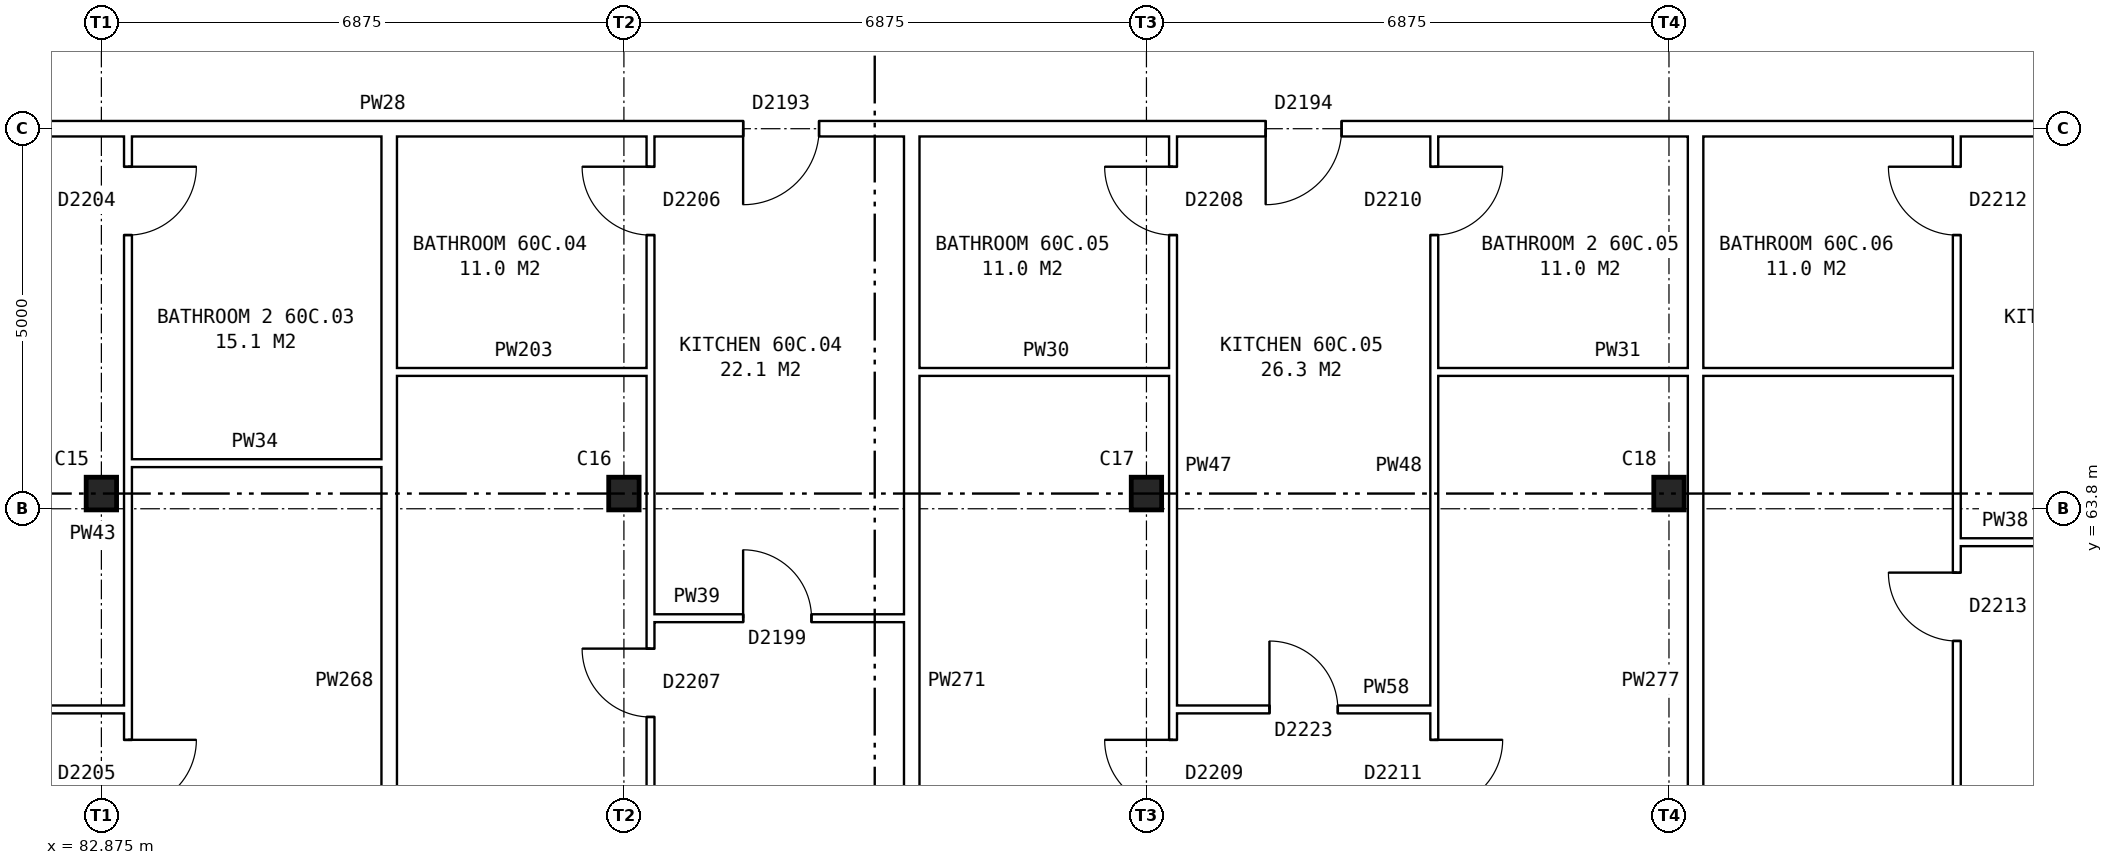
"""IFC4 building model, lengths in metres.
Left out: names, types, materials, properties, quantities, classifications, styles, units other than length and angle.
Written with IfcOpenShell. Run it as: python <this file> out.ifc"""

import sys

from ifc_helpers import new_model, si_unit, direction, frame, frame_2d, origin, origin_2d, place, context, subcontext, project, spatial, rectangle, i_section, extrude, element, fill, save


model = new_model("IFC4")
c1 = context("Model", 3, precision=1e-05, world=origin(), true_north=direction((0.0, 1.0)))
c2 = subcontext(c1, "Body", "Model", "MODEL_VIEW")
j1 = project(units=[si_unit("LENGTHUNIT", "METRE"), si_unit("PLANEANGLEUNIT", "RADIAN")], contexts=[c1])
p1 = place(None, origin())
s1 = spatial("IfcSite", under=j1, at=p1, CompositionType="ELEMENT")
p2 = place(p1, origin())
s2 = spatial("IfcBuilding", under=s1, at=p2, CompositionType="ELEMENT")
p3 = place(p2, frame((0.0, 0.0, 212.1)))
s3 = spatial("IfcBuildingStorey", under=s2, at=p3, CompositionType="ELEMENT", Elevation=212.1)
for number, where, z_axis, x_axis in (
    (1, (82.875, 64.0, 0.0), (0.0, 0.0, 1.0), (1.0, 0.0, 0.0)),
    (2, (89.75, 64.0, 0.0), (0.0, 0.0, 1.0), (1.0, 0.0, 0.0)),
    (3, (96.625, 64.0, 0.0), (0.0, 0.0, 1.0), (1.0, 0.0, 0.0)),
    (4, (103.5, 64.0, 0.0), (0.0, 0.0, 1.0), (1.0, 0.0, 0.0)),
):
    element("IfcColumn", number, at=place(p3, frame(where, z_axis=z_axis, x_axis=x_axis)), inside=s3, PredefinedType="COLUMN", context=c2, shape_type="SweptSolid", body=[
        extrude(i_section(OverallWidth=0.4, OverallDepth=0.43, WebThickness=0.04, FlangeThickness=0.04, at=origin_2d()), origin(), (0.0, 0.0, 1.0), 2.85),
    ])
p4 = place(p3, frame((79.438, 61.16, 0.0), z_axis=(0.0, 0.0, 1.0), x_axis=(1.0, 0.0, 0.0)))
e5 = element("IfcWall", 5, at=p4, inside=s3, PredefinedType="PARTITIONING", context=c2, shape_type="SweptSolid", body=[
    extrude(rectangle(XDim=3.787, YDim=0.1, at=frame_2d((1.894, 0.0))), origin(), (0.0, 0.0, 1.0), 2.85),
])
p5 = place(p4, frame((1.444, 0.0, 0.0)))
e6 = element("IfcOpeningElement", 6, at=p5, cuts=e5, PredefinedType="OPENING", context=c2, shape_type="SweptSolid", body=[
    extrude(rectangle(XDim=0.9, YDim=2.1, at=frame_2d((0.45, 1.05))), frame((0.0, 0.06, 0.0), z_axis=(0.0, -1.0, 0.0), x_axis=(1.0, 0.0, 0.0)), (0.0, 0.0, 1.0), 0.12),
])
p6 = place(p3, frame((96.975, 61.16, 0.0), z_axis=(0.0, 0.0, 1.0), x_axis=(1.0, 0.0, 0.0)))
e7 = element("IfcWall", 7, at=p6, inside=s3, PredefinedType="PARTITIONING", context=c2, shape_type="SweptSolid", body=[
    extrude(rectangle(XDim=3.437, YDim=0.1, at=frame_2d((1.719, 0.0))), origin(), (0.0, 0.0, 1.0), 2.85),
])
p7 = place(p6, frame((1.269, 0.0, 0.0)))
e8 = element("IfcOpeningElement", 8, at=p7, cuts=e7, PredefinedType="OPENING", context=c2, shape_type="SweptSolid", body=[
    extrude(rectangle(XDim=0.9, YDim=2.1, at=frame_2d((0.45, 1.05))), frame((0.0, 0.06, 0.0), z_axis=(0.0, -1.0, 0.0), x_axis=(1.0, 0.0, 0.0)), (0.0, 0.0, 1.0), 0.12),
])
p8 = place(p3, frame((90.1, 62.36, 0.0), z_axis=(0.0, 0.0, 1.0), x_axis=(1.0, 0.0, 0.0)))
e9 = element("IfcWall", 9, at=p8, inside=s3, PredefinedType="PARTITIONING", context=c2, shape_type="SweptSolid", body=[
    extrude(rectangle(XDim=3.337, YDim=0.1, at=frame_2d((1.668, 0.0))), origin(), (0.0, 0.0, 1.0), 2.85),
])
p9 = place(p8, frame((1.219, 0.0, 0.0)))
e10 = element("IfcOpeningElement", 10, at=p9, cuts=e9, PredefinedType="OPENING", context=c2, shape_type="SweptSolid", body=[
    extrude(rectangle(XDim=0.9, YDim=2.1, at=frame_2d((0.45, 1.05))), frame((0.0, 0.06, 0.0), z_axis=(0.0, -1.0, 0.0), x_axis=(1.0, 0.0, 0.0)), (0.0, 0.0, 1.0), 0.12),
])
p10 = place(p3, frame((107.287, 63.36, 0.0), z_axis=(0.0, 0.0, 1.0), x_axis=(1.0, 0.0, 0.0)))
e11 = element("IfcWall", 11, at=p10, inside=s3, PredefinedType="PARTITIONING", context=c2, shape_type="SweptSolid", body=[
    extrude(rectangle(XDim=3.438, YDim=0.1, at=frame_2d((1.719, 0.0))), origin(), (0.0, 0.0, 1.0), 2.85),
])
p11 = place(p10, frame((1.269, 0.0, 0.0)))
e12 = element("IfcOpeningElement", 12, at=p11, cuts=e11, PredefinedType="OPENING", context=c2, shape_type="SweptSolid", body=[
    extrude(rectangle(XDim=0.9, YDim=2.1, at=frame_2d((0.45, 1.05))), frame((0.0, 0.06, 0.0), z_axis=(0.0, -1.0, 0.0), x_axis=(1.0, 0.0, 0.0)), (0.0, 0.0, 1.0), 0.12),
])
p12 = place(p3, frame((83.225, 64.4, 0.0), z_axis=(0.0, 0.0, 1.0), x_axis=(1.0, 0.0, 0.0)))
e13 = element("IfcWall", 13, at=p12, inside=s3, PredefinedType="PARTITIONING", context=c2, shape_type="SweptSolid", body=[
    extrude(rectangle(XDim=3.337, YDim=0.1, at=frame_2d((1.668, 0.0))), origin(), (0.0, 0.0, 1.0), 2.85),
])
for number, where, z_axis, x_axis in (
    (14, (86.762, 65.6, 0.0), (0.0, 0.0, 1.0), (1.0, 0.0, 0.0)),
    (15, (93.637, 65.6, 0.0), (0.0, 0.0, 1.0), (1.0, 0.0, 0.0)),
):
    element("IfcWall", number, at=place(p3, frame(where, z_axis=z_axis, x_axis=x_axis)), inside=s3, PredefinedType="PARTITIONING", context=c2, shape_type="SweptSolid", body=[
        extrude(rectangle(XDim=3.338, YDim=0.1, at=frame_2d((1.669, 0.0))), origin(), (0.0, 0.0, 1.0), 2.85),
    ])
p13 = place(p3, frame((100.412, 65.6, 0.0), z_axis=(0.0, 0.0, 1.0), x_axis=(1.0, 0.0, 0.0)))
e16 = element("IfcWall", 16, at=p13, inside=s3, PredefinedType="PARTITIONING", context=c2, shape_type="SweptSolid", body=[
    extrude(rectangle(XDim=6.875, YDim=0.1, at=frame_2d((3.438, 0.0))), origin(), (0.0, 0.0, 1.0), 2.85),
])
p14 = place(p3, frame((75.64, 68.8, 0.0), z_axis=(0.0, 0.0, 1.0), x_axis=(1.0, 0.0, 0.0)))
e17 = element("IfcWall", 17, at=p14, inside=s3, PredefinedType="PARTITIONING", context=c2, shape_type="SweptSolid", body=[
    extrude(rectangle(XDim=55.72, YDim=0.2, at=frame_2d((27.86, 0.0))), origin(), (0.0, 0.0, 1.0), 2.85),
])
p15 = place(p14, frame((5.191, 0.0, 0.0)))
e18 = element("IfcOpeningElement", 18, at=p15, cuts=e17, PredefinedType="OPENING", context=c2, shape_type="SweptSolid", body=[
    extrude(rectangle(XDim=1.0, YDim=2.1, at=frame_2d((0.5, 1.05))), frame((0.0, 0.11, 0.0), z_axis=(0.0, -1.0, 0.0), x_axis=(1.0, 0.0, 0.0)), (0.0, 0.0, 1.0), 0.22),
])
p16 = place(p14, frame((15.678, 0.0, 0.0)))
e19 = element("IfcOpeningElement", 19, at=p16, cuts=e17, PredefinedType="OPENING", context=c2, shape_type="SweptSolid", body=[
    extrude(rectangle(XDim=1.0, YDim=2.1, at=frame_2d((0.5, 1.05))), frame((0.0, 0.11, 0.0), z_axis=(0.0, -1.0, 0.0), x_axis=(1.0, 0.0, 0.0)), (0.0, 0.0, 1.0), 0.22),
])
p17 = place(p14, frame((22.553, 0.0, 0.0)))
e20 = element("IfcOpeningElement", 20, at=p17, cuts=e17, PredefinedType="OPENING", context=c2, shape_type="SweptSolid", body=[
    extrude(rectangle(XDim=1.0, YDim=2.1, at=frame_2d((0.5, 1.05))), frame((0.0, 0.11, 0.0), z_axis=(0.0, -1.0, 0.0), x_axis=(1.0, 0.0, 0.0)), (0.0, 0.0, 1.0), 0.22),
])
p18 = place(p14, frame((32.866, 0.0, 0.0)))
e21 = element("IfcOpeningElement", 21, at=p18, cuts=e17, PredefinedType="OPENING", context=c2, shape_type="SweptSolid", body=[
    extrude(rectangle(XDim=1.0, YDim=2.1, at=frame_2d((0.5, 1.05))), frame((0.0, 0.11, 0.0), z_axis=(0.0, -1.0, 0.0), x_axis=(1.0, 0.0, 0.0)), (0.0, 0.0, 1.0), 0.22),
])
p19 = place(p14, frame((43.178, 0.0, 0.0)))
e22 = element("IfcOpeningElement", 22, at=p19, cuts=e17, PredefinedType="OPENING", context=c2, shape_type="SweptSolid", body=[
    extrude(rectangle(XDim=1.0, YDim=2.1, at=frame_2d((0.5, 1.05))), frame((0.0, 0.11, 0.0), z_axis=(0.0, -1.0, 0.0), x_axis=(1.0, 0.0, 0.0)), (0.0, 0.0, 1.0), 0.22),
])
p20 = place(p14, frame((50.053, 0.0, 0.0)))
e23 = element("IfcOpeningElement", 23, at=p20, cuts=e17, PredefinedType="OPENING", context=c2, shape_type="SweptSolid", body=[
    extrude(rectangle(XDim=1.0, YDim=2.1, at=frame_2d((0.5, 1.05))), frame((0.0, 0.11, 0.0), z_axis=(0.0, -1.0, 0.0), x_axis=(1.0, 0.0, 0.0)), (0.0, 0.0, 1.0), 0.22),
])
p21 = place(p3, frame((83.225, 54.36, 0.0), z_axis=(0.0, 0.0, 1.0), x_axis=(0.0, 1.0, 0.0)))
e24 = element("IfcWall", 24, at=p21, inside=s3, PredefinedType="PARTITIONING", context=c2, shape_type="SweptSolid", body=[
    extrude(rectangle(XDim=14.34, YDim=0.1, at=frame_2d((7.17, 0.0))), origin(), (0.0, 0.0, 1.0), 2.85),
])
p22 = place(p21, frame((5.5, 0.0, 0.0)))
e25 = element("IfcOpeningElement", 25, at=p22, cuts=e24, PredefinedType="OPENING", context=c2, shape_type="SweptSolid", body=[
    extrude(rectangle(XDim=0.9, YDim=2.1, at=frame_2d((0.45, 1.05))), frame((0.0, 0.06, 0.0), z_axis=(0.0, -1.0, 0.0), x_axis=(1.0, 0.0, 0.0)), (0.0, 0.0, 1.0), 0.12),
])
p23 = place(p21, frame((13.04, 0.0, 0.0)))
e26 = element("IfcOpeningElement", 26, at=p23, cuts=e24, PredefinedType="OPENING", context=c2, shape_type="SweptSolid", body=[
    extrude(rectangle(XDim=0.9, YDim=2.1, at=frame_2d((0.45, 1.05))), frame((0.0, 0.06, 0.0), z_axis=(0.0, -1.0, 0.0), x_axis=(1.0, 0.0, 0.0)), (0.0, 0.0, 1.0), 0.12),
])
p24 = place(p3, frame((86.662, 54.36, 0.0), z_axis=(0.0, 0.0, 1.0), x_axis=(0.0, 1.0, 0.0)))
e27 = element("IfcWall", 27, at=p24, inside=s3, PredefinedType="PARTITIONING", context=c2, shape_type="SweptSolid", body=[
    extrude(rectangle(XDim=14.34, YDim=0.2, at=frame_2d((7.17, 0.0))), origin(), (0.0, 0.0, 1.0), 2.85),
])
p25 = place(p3, frame((90.1, 54.36, 0.0), z_axis=(0.0, 0.0, 1.0), x_axis=(0.0, 1.0, 0.0)))
e28 = element("IfcWall", 28, at=p25, inside=s3, PredefinedType="PARTITIONING", context=c2, shape_type="SweptSolid", body=[
    extrude(rectangle(XDim=14.34, YDim=0.1, at=frame_2d((7.17, 0.0))), origin(), (0.0, 0.0, 1.0), 2.85),
])
p26 = place(p25, frame((6.7, 0.0, 0.0)))
e29 = element("IfcOpeningElement", 29, at=p26, cuts=e28, PredefinedType="OPENING", context=c2, shape_type="SweptSolid", body=[
    extrude(rectangle(XDim=0.9, YDim=2.1, at=frame_2d((0.45, 1.05))), frame((0.0, 0.06, 0.0), z_axis=(0.0, -1.0, 0.0), x_axis=(1.0, 0.0, 0.0)), (0.0, 0.0, 1.0), 0.12),
])
p27 = place(p25, frame((13.04, 0.0, 0.0)))
e30 = element("IfcOpeningElement", 30, at=p27, cuts=e28, PredefinedType="OPENING", context=c2, shape_type="SweptSolid", body=[
    extrude(rectangle(XDim=0.9, YDim=2.1, at=frame_2d((0.45, 1.05))), frame((0.0, 0.06, 0.0), z_axis=(0.0, -1.0, 0.0), x_axis=(1.0, 0.0, 0.0)), (0.0, 0.0, 1.0), 0.12),
])
p28 = place(p3, frame((93.537, 54.36, 0.0), z_axis=(0.0, 0.0, 1.0), x_axis=(0.0, 1.0, 0.0)))
e31 = element("IfcWall", 31, at=p28, inside=s3, PredefinedType="PARTITIONING", context=c2, shape_type="SweptSolid", body=[
    extrude(rectangle(XDim=14.34, YDim=0.2, at=frame_2d((7.17, 0.0))), origin(), (0.0, 0.0, 1.0), 2.85),
])
p29 = place(p3, frame((96.975, 54.36, 0.0), z_axis=(0.0, 0.0, 1.0), x_axis=(0.0, 1.0, 0.0)))
e32 = element("IfcWall", 32, at=p29, inside=s3, PredefinedType="PARTITIONING", context=c2, shape_type="SweptSolid", body=[
    extrude(rectangle(XDim=14.34, YDim=0.1, at=frame_2d((7.17, 0.0))), origin(), (0.0, 0.0, 1.0), 2.85),
])
p30 = place(p29, frame((5.5, 0.0, 0.0)))
e33 = element("IfcOpeningElement", 33, at=p30, cuts=e32, PredefinedType="OPENING", context=c2, shape_type="SweptSolid", body=[
    extrude(rectangle(XDim=0.9, YDim=2.1, at=frame_2d((0.45, 1.05))), frame((0.0, 0.06, 0.0), z_axis=(0.0, -1.0, 0.0), x_axis=(1.0, 0.0, 0.0)), (0.0, 0.0, 1.0), 0.12),
])
p31 = place(p29, frame((13.04, 0.0, 0.0)))
e34 = element("IfcOpeningElement", 34, at=p31, cuts=e32, PredefinedType="OPENING", context=c2, shape_type="SweptSolid", body=[
    extrude(rectangle(XDim=0.9, YDim=2.1, at=frame_2d((0.45, 1.05))), frame((0.0, 0.06, 0.0), z_axis=(0.0, -1.0, 0.0), x_axis=(1.0, 0.0, 0.0)), (0.0, 0.0, 1.0), 0.12),
])
p32 = place(p3, frame((100.412, 54.36, 0.0), z_axis=(0.0, 0.0, 1.0), x_axis=(0.0, 1.0, 0.0)))
e35 = element("IfcWall", 35, at=p32, inside=s3, PredefinedType="PARTITIONING", context=c2, shape_type="SweptSolid", body=[
    extrude(rectangle(XDim=14.34, YDim=0.1, at=frame_2d((7.17, 0.0))), origin(), (0.0, 0.0, 1.0), 2.85),
])
p33 = place(p32, frame((5.5, 0.0, 0.0)))
e36 = element("IfcOpeningElement", 36, at=p33, cuts=e35, PredefinedType="OPENING", context=c2, shape_type="SweptSolid", body=[
    extrude(rectangle(XDim=0.9, YDim=2.1, at=frame_2d((0.45, 1.05))), frame((0.0, 0.06, 0.0), z_axis=(0.0, -1.0, 0.0), x_axis=(1.0, 0.0, 0.0)), (0.0, 0.0, 1.0), 0.12),
])
p34 = place(p32, frame((13.04, 0.0, 0.0)))
e37 = element("IfcOpeningElement", 37, at=p34, cuts=e35, PredefinedType="OPENING", context=c2, shape_type="SweptSolid", body=[
    extrude(rectangle(XDim=0.9, YDim=2.1, at=frame_2d((0.45, 1.05))), frame((0.0, 0.06, 0.0), z_axis=(0.0, -1.0, 0.0), x_axis=(1.0, 0.0, 0.0)), (0.0, 0.0, 1.0), 0.12),
])
p35 = place(p3, frame((103.85, 54.36, 0.0), z_axis=(0.0, 0.0, 1.0), x_axis=(0.0, 1.0, 0.0)))
e38 = element("IfcWall", 38, at=p35, inside=s3, PredefinedType="PARTITIONING", context=c2, shape_type="SweptSolid", body=[
    extrude(rectangle(XDim=14.34, YDim=0.2, at=frame_2d((7.17, 0.0))), origin(), (0.0, 0.0, 1.0), 2.85),
])
p36 = place(p3, frame((107.287, 54.36, 0.0), z_axis=(0.0, 0.0, 1.0), x_axis=(0.0, 1.0, 0.0)))
e39 = element("IfcWall", 39, at=p36, inside=s3, PredefinedType="PARTITIONING", context=c2, shape_type="SweptSolid", body=[
    extrude(rectangle(XDim=14.34, YDim=0.1, at=frame_2d((7.17, 0.0))), origin(), (0.0, 0.0, 1.0), 2.85),
])
p37 = place(p36, frame((7.7, 0.0, 0.0)))
e40 = element("IfcOpeningElement", 40, at=p37, cuts=e39, PredefinedType="OPENING", context=c2, shape_type="SweptSolid", body=[
    extrude(rectangle(XDim=0.9, YDim=2.1, at=frame_2d((0.45, 1.05))), frame((0.0, 0.06, 0.0), z_axis=(0.0, -1.0, 0.0), x_axis=(1.0, 0.0, 0.0)), (0.0, 0.0, 1.0), 0.12),
])
p38 = place(p36, frame((13.04, 0.0, 0.0)))
e41 = element("IfcOpeningElement", 41, at=p38, cuts=e39, PredefinedType="OPENING", context=c2, shape_type="SweptSolid", body=[
    extrude(rectangle(XDim=0.9, YDim=2.1, at=frame_2d((0.45, 1.05))), frame((0.0, 0.06, 0.0), z_axis=(0.0, -1.0, 0.0), x_axis=(1.0, 0.0, 0.0)), (0.0, 0.0, 1.0), 0.12),
])
p39 = place(p22, frame((0.9, 0.0, 0.0), z_axis=(0.0, 0.0, 1.0), x_axis=(-1.0, 0.0, 0.0)))
e42 = element("IfcDoor", 42, at=p39, inside=s3, OperationType="SINGLE_SWING_LEFT", PredefinedType="DOOR", context=c2, shape_type="SweptSolid", body=[
    extrude(rectangle(XDim=0.9, YDim=2.1, at=frame_2d((0.45, 1.05))), frame((0.0, 0.025, 0.0), z_axis=(0.0, -1.0, 0.0), x_axis=(1.0, 0.0, 0.0)), (0.0, 0.0, 1.0), 0.05),
])
fill(e25, e42)
p40 = place(p23, frame((0.9, 0.0, 0.0), z_axis=(0.0, 0.0, 1.0), x_axis=(-1.0, 0.0, 0.0)))
e43 = element("IfcDoor", 43, at=p40, inside=s3, OperationType="SINGLE_SWING_LEFT", PredefinedType="DOOR", context=c2, shape_type="SweptSolid", body=[
    extrude(rectangle(XDim=0.9, YDim=2.1, at=frame_2d((0.45, 1.05))), frame((0.0, 0.025, 0.0), z_axis=(0.0, -1.0, 0.0), x_axis=(1.0, 0.0, 0.0)), (0.0, 0.0, 1.0), 0.05),
])
fill(e26, e43)
p41 = place(p26, origin())
e44 = element("IfcDoor", 44, at=p41, inside=s3, OperationType="SINGLE_SWING_RIGHT", PredefinedType="DOOR", context=c2, shape_type="SweptSolid", body=[
    extrude(rectangle(XDim=0.9, YDim=2.1, at=frame_2d((0.45, 1.05))), frame((0.0, 0.025, 0.0), z_axis=(0.0, -1.0, 0.0), x_axis=(1.0, 0.0, 0.0)), (0.0, 0.0, 1.0), 0.05),
])
fill(e29, e44)
p42 = place(p16, frame((1.0, 0.0, 0.0), z_axis=(0.0, 0.0, 1.0), x_axis=(-1.0, 0.0, 0.0)))
e45 = element("IfcDoor", 45, at=p42, inside=s3, OperationType="SINGLE_SWING_RIGHT", PredefinedType="DOOR", context=c2, shape_type="SweptSolid", body=[
    extrude(rectangle(XDim=1.0, YDim=2.1, at=frame_2d((0.5, 1.05))), frame((0.0, 0.025, 0.0), z_axis=(0.0, -1.0, 0.0), x_axis=(1.0, 0.0, 0.0)), (0.0, 0.0, 1.0), 0.05),
])
fill(e19, e45)
p43 = place(p9, origin())
e46 = element("IfcDoor", 46, at=p43, inside=s3, OperationType="SINGLE_SWING_LEFT", PredefinedType="DOOR", context=c2, shape_type="SweptSolid", body=[
    extrude(rectangle(XDim=0.9, YDim=2.1, at=frame_2d((0.45, 1.05))), frame((0.0, 0.025, 0.0), z_axis=(0.0, -1.0, 0.0), x_axis=(1.0, 0.0, 0.0)), (0.0, 0.0, 1.0), 0.05),
])
fill(e10, e46)
p44 = place(p27, origin())
e47 = element("IfcDoor", 47, at=p44, inside=s3, OperationType="SINGLE_SWING_RIGHT", PredefinedType="DOOR", context=c2, shape_type="SweptSolid", body=[
    extrude(rectangle(XDim=0.9, YDim=2.1, at=frame_2d((0.45, 1.05))), frame((0.0, 0.025, 0.0), z_axis=(0.0, -1.0, 0.0), x_axis=(1.0, 0.0, 0.0)), (0.0, 0.0, 1.0), 0.05),
])
fill(e30, e47)
p45 = place(p30, origin())
e48 = element("IfcDoor", 48, at=p45, inside=s3, OperationType="SINGLE_SWING_RIGHT", PredefinedType="DOOR", context=c2, shape_type="SweptSolid", body=[
    extrude(rectangle(XDim=0.9, YDim=2.1, at=frame_2d((0.45, 1.05))), frame((0.0, 0.025, 0.0), z_axis=(0.0, -1.0, 0.0), x_axis=(1.0, 0.0, 0.0)), (0.0, 0.0, 1.0), 0.05),
])
fill(e33, e48)
p46 = place(p33, frame((0.9, 0.0, 0.0), z_axis=(0.0, 0.0, 1.0), x_axis=(-1.0, 0.0, 0.0)))
e49 = element("IfcDoor", 49, at=p46, inside=s3, OperationType="SINGLE_SWING_LEFT", PredefinedType="DOOR", context=c2, shape_type="SweptSolid", body=[
    extrude(rectangle(XDim=0.9, YDim=2.1, at=frame_2d((0.45, 1.05))), frame((0.0, 0.025, 0.0), z_axis=(0.0, -1.0, 0.0), x_axis=(1.0, 0.0, 0.0)), (0.0, 0.0, 1.0), 0.05),
])
fill(e36, e49)
p47 = place(p17, frame((1.0, 0.0, 0.0), z_axis=(0.0, 0.0, 1.0), x_axis=(-1.0, 0.0, 0.0)))
e50 = element("IfcDoor", 50, at=p47, inside=s3, OperationType="SINGLE_SWING_RIGHT", PredefinedType="DOOR", context=c2, shape_type="SweptSolid", body=[
    extrude(rectangle(XDim=1.0, YDim=2.1, at=frame_2d((0.5, 1.05))), frame((0.0, 0.025, 0.0), z_axis=(0.0, -1.0, 0.0), x_axis=(1.0, 0.0, 0.0)), (0.0, 0.0, 1.0), 0.05),
])
fill(e20, e50)
p48 = place(p7, origin())
e51 = element("IfcDoor", 51, at=p48, inside=s3, OperationType="SINGLE_SWING_LEFT", PredefinedType="DOOR", context=c2, shape_type="SweptSolid", body=[
    extrude(rectangle(XDim=0.9, YDim=2.1, at=frame_2d((0.45, 1.05))), frame((0.0, 0.025, 0.0), z_axis=(0.0, -1.0, 0.0), x_axis=(1.0, 0.0, 0.0)), (0.0, 0.0, 1.0), 0.05),
])
fill(e8, e51)
p49 = place(p31, origin())
e52 = element("IfcDoor", 52, at=p49, inside=s3, OperationType="SINGLE_SWING_RIGHT", PredefinedType="DOOR", context=c2, shape_type="SweptSolid", body=[
    extrude(rectangle(XDim=0.9, YDim=2.1, at=frame_2d((0.45, 1.05))), frame((0.0, 0.025, 0.0), z_axis=(0.0, -1.0, 0.0), x_axis=(1.0, 0.0, 0.0)), (0.0, 0.0, 1.0), 0.05),
])
fill(e34, e52)
p50 = place(p34, frame((0.9, 0.0, 0.0), z_axis=(0.0, 0.0, 1.0), x_axis=(-1.0, 0.0, 0.0)))
e53 = element("IfcDoor", 53, at=p50, inside=s3, OperationType="SINGLE_SWING_LEFT", PredefinedType="DOOR", context=c2, shape_type="SweptSolid", body=[
    extrude(rectangle(XDim=0.9, YDim=2.1, at=frame_2d((0.45, 1.05))), frame((0.0, 0.025, 0.0), z_axis=(0.0, -1.0, 0.0), x_axis=(1.0, 0.0, 0.0)), (0.0, 0.0, 1.0), 0.05),
])
fill(e37, e53)
p51 = place(p37, origin())
e54 = element("IfcDoor", 54, at=p51, inside=s3, OperationType="SINGLE_SWING_RIGHT", PredefinedType="DOOR", context=c2, shape_type="SweptSolid", body=[
    extrude(rectangle(XDim=0.9, YDim=2.1, at=frame_2d((0.45, 1.05))), frame((0.0, 0.025, 0.0), z_axis=(0.0, -1.0, 0.0), x_axis=(1.0, 0.0, 0.0)), (0.0, 0.0, 1.0), 0.05),
])
fill(e40, e54)
p52 = place(p38, origin())
e55 = element("IfcDoor", 55, at=p52, inside=s3, OperationType="SINGLE_SWING_RIGHT", PredefinedType="DOOR", context=c2, shape_type="SweptSolid", body=[
    extrude(rectangle(XDim=0.9, YDim=2.1, at=frame_2d((0.45, 1.05))), frame((0.0, 0.025, 0.0), z_axis=(0.0, -1.0, 0.0), x_axis=(1.0, 0.0, 0.0)), (0.0, 0.0, 1.0), 0.05),
])
fill(e41, e55)
save(model, sys.argv[1])
